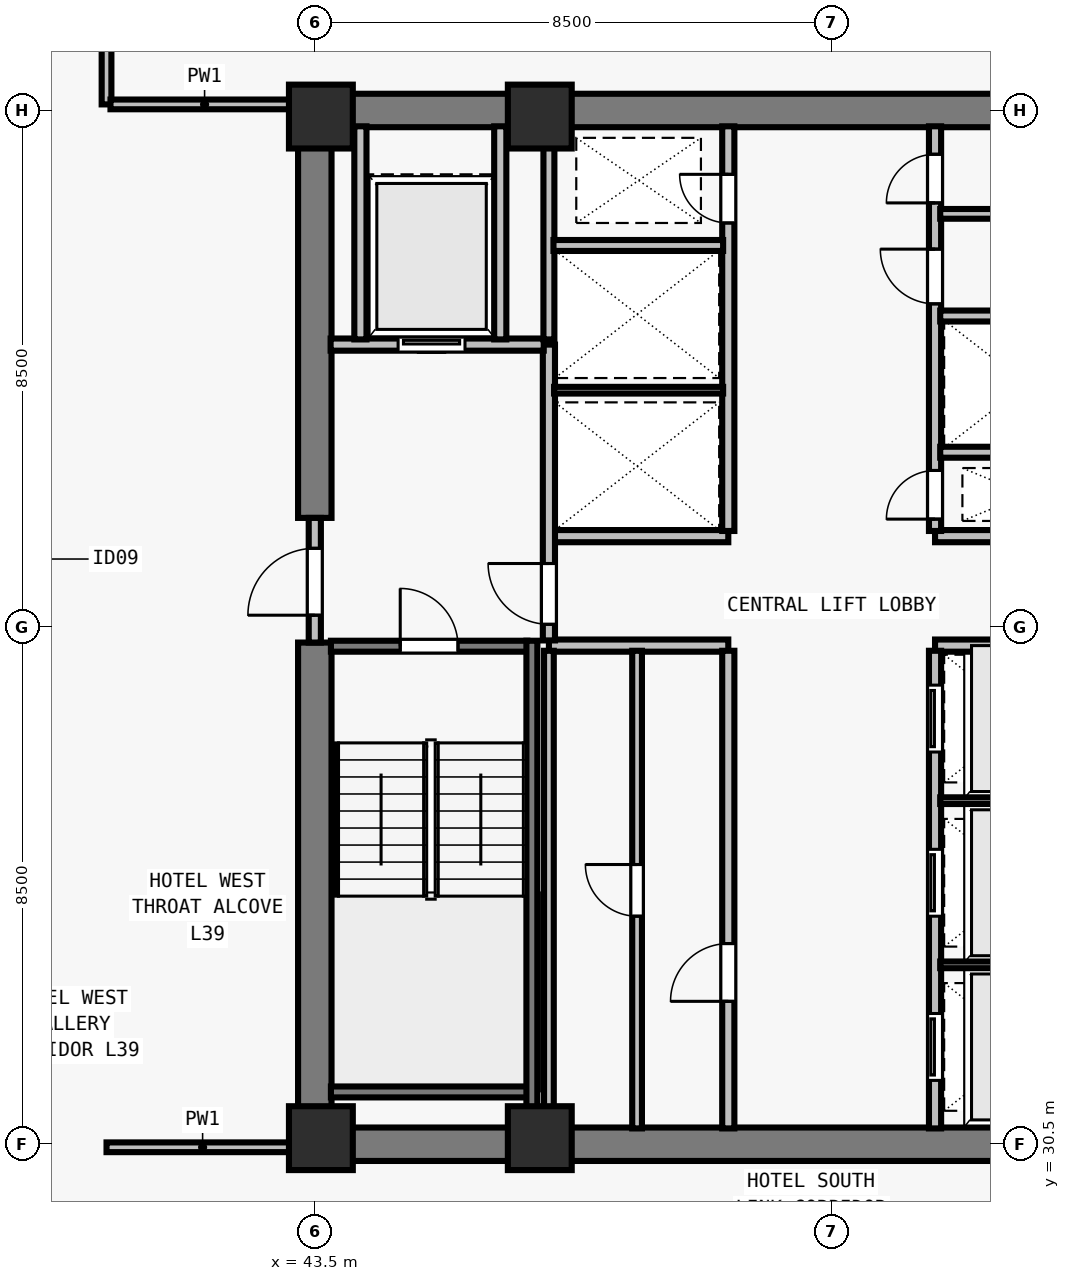
"""IFC4 building model, lengths in metres.
Left out: names, types, materials, properties, quantities, classifications, styles, units other than length and angle.
Written with IfcOpenShell. Run it as: python <this file> out.ifc"""

import sys

from ifc_helpers import new_model, si_unit, direction, frame, frame_2d, origin, origin_2d, place, context, subcontext, project, spatial, rectangle, extrude, element, fill, save


model = new_model("IFC4")
c1 = context("Model", 3, precision=1e-05, world=origin(), true_north=direction((0.0, 1.0)))
c2 = subcontext(c1, "Body", "Model", "MODEL_VIEW")
j1 = project(units=[si_unit("LENGTHUNIT", "METRE"), si_unit("PLANEANGLEUNIT", "RADIAN")], contexts=[c1])
p1 = place(None, origin())
s1 = spatial("IfcSite", under=j1, at=p1, CompositionType="ELEMENT")
p2 = place(p1, origin())
s2 = spatial("IfcBuilding", under=s1, at=p2, CompositionType="ELEMENT")
p3 = place(p2, frame((0.0, 0.0, 144.5)))
s3 = spatial("IfcBuildingStorey", under=s2, at=p3, CompositionType="ELEMENT", Elevation=144.5)
for number, where, z_axis, x_axis in (
    (1, (43.6, 30.6, 0.0), (0.0, 0.0, 1.0), (1.0, 0.0, 0.0)),
    (2, (47.2, 30.6, 0.0), (0.0, 0.0, 1.0), (1.0, 0.0, 0.0)),
    (3, (43.6, 47.4, 0.0), (0.0, 0.0, 1.0), (1.0, 0.0, 0.0)),
    (4, (47.2, 47.4, 0.0), (0.0, 0.0, 1.0), (1.0, 0.0, 0.0)),
):
    element("IfcColumn", number, at=place(p3, frame(where, z_axis=z_axis, x_axis=x_axis)), inside=s3, PredefinedType="COLUMN", context=c2, shape_type="SweptSolid", body=[
        extrude(rectangle(XDim=1.05, YDim=1.05, at=origin_2d()), origin(), (0.0, 0.0, 1.0), 3.5),
    ])
for number, where, z_axis, x_axis in (
    (5, (43.225, 30.5, 0.0), (0.0, 0.0, 1.0), (1.0, 0.0, 0.0)),
    (6, (43.225, 47.5, 0.0), (0.0, 0.0, 1.0), (1.0, 0.0, 0.0)),
):
    element("IfcWall", number, at=place(p3, frame(where, z_axis=z_axis, x_axis=x_axis)), inside=s3, PredefinedType="SHEAR", context=c2, shape_type="SweptSolid", body=[
        extrude(rectangle(XDim=17.55, YDim=0.55, at=frame_2d((8.775, 0.0))), origin(), (0.0, 0.0, 1.0), 3.28),
    ])
p4 = place(p3, frame((43.5, 30.765, 0.0), z_axis=(0.0, 0.0, 1.0), x_axis=(0.0, 1.0, 0.0)))
e7 = element("IfcWall", 7, at=p4, inside=s3, PredefinedType="SHEAR", context=c2, shape_type="SweptSolid", body=[
    extrude(rectangle(XDim=7.985, YDim=0.55, at=frame_2d((3.993, 0.0))), origin(), (0.0, 0.0, 1.0), 3.28),
])
p5 = place(p3, frame((43.5, 40.8, 0.0), z_axis=(0.0, 0.0, 1.0), x_axis=(0.0, 1.0, 0.0)))
e8 = element("IfcWall", 8, at=p5, inside=s3, PredefinedType="SHEAR", context=c2, shape_type="SweptSolid", body=[
    extrude(rectangle(XDim=6.435, YDim=0.55, at=frame_2d((3.218, 0.0))), origin(), (0.0, 0.0, 1.0), 3.28),
])
for number, where, z_axis, x_axis in (
    (9, (47.35, 38.7, 0.0), (0.0, 0.0, 1.0), (1.0, 0.0, 0.0)),
    (10, (47.35, 40.5, 0.0), (0.0, 0.0, 1.0), (1.0, 0.0, 0.0)),
    (11, (53.7, 38.7, 0.0), (0.0, 0.0, 1.0), (1.0, 0.0, 0.0)),
    (12, (53.7, 40.5, 0.0), (0.0, 0.0, 1.0), (1.0, 0.0, 0.0)),
):
    element("IfcWall", number, at=place(p3, frame(where, z_axis=z_axis, x_axis=x_axis)), inside=s3, PredefinedType="SOLIDWALL", context=c2, shape_type="SweptSolid", body=[
        extrude(rectangle(XDim=2.95, YDim=0.2, at=frame_2d((1.475, 0.0))), origin(), (0.0, 0.0, 1.0), 3.28),
    ])
p6 = place(p3, frame((50.3, 30.76, 0.0), z_axis=(0.0, 0.0, 1.0), x_axis=(0.0, 1.0, 0.0)))
e13 = element("IfcWall", 13, at=p6, inside=s3, PredefinedType="SOLIDWALL", context=c2, shape_type="SweptSolid", body=[
    extrude(rectangle(XDim=7.855, YDim=0.2, at=frame_2d((3.927, 0.0))), origin(), (0.0, 0.0, 1.0), 3.28),
])
p7 = place(p6, frame((2.09, 0.0, 0.0)))
e14 = element("IfcOpeningElement", 14, at=p7, cuts=e13, PredefinedType="OPENING", context=c2, shape_type="SweptSolid", body=[
    extrude(rectangle(XDim=0.95, YDim=2.12, at=frame_2d((0.475, 1.06))), frame((0.0, 0.11, 0.0), z_axis=(0.0, -1.0, 0.0), x_axis=(1.0, 0.0, 0.0)), (0.0, 0.0, 1.0), 0.22),
])
p8 = place(p3, frame((53.7, 30.76, 0.0), z_axis=(0.0, 0.0, 1.0), x_axis=(0.0, 1.0, 0.0)))
e15 = element("IfcWall", 15, at=p8, inside=s3, PredefinedType="SOLIDWALL", context=c2, shape_type="SweptSolid", body=[
    extrude(rectangle(XDim=7.855, YDim=0.2, at=frame_2d((3.927, 0.0))), origin(), (0.0, 0.0, 1.0), 3.28),
])
p9 = place(p8, frame((0.79, 0.0, 0.0)))
e16 = element("IfcOpeningElement", 16, at=p9, cuts=e15, PredefinedType="OPENING", context=c2, shape_type="SweptSolid", body=[
    extrude(rectangle(XDim=1.1, YDim=2.2, at=frame_2d((0.55, 1.1))), frame((0.0, 0.11, 0.0), z_axis=(0.0, -1.0, 0.0), x_axis=(1.0, 0.0, 0.0)), (0.0, 0.0, 1.0), 0.22),
])
p10 = place(p8, frame((3.49, 0.0, 0.0)))
e17 = element("IfcOpeningElement", 17, at=p10, cuts=e15, PredefinedType="OPENING", context=c2, shape_type="SweptSolid", body=[
    extrude(rectangle(XDim=1.1, YDim=2.2, at=frame_2d((0.55, 1.1))), frame((0.0, 0.11, 0.0), z_axis=(0.0, -1.0, 0.0), x_axis=(1.0, 0.0, 0.0)), (0.0, 0.0, 1.0), 0.22),
])
p11 = place(p8, frame((6.19, 0.0, 0.0)))
e18 = element("IfcOpeningElement", 18, at=p11, cuts=e15, PredefinedType="OPENING", context=c2, shape_type="SweptSolid", body=[
    extrude(rectangle(XDim=1.1, YDim=2.2, at=frame_2d((0.55, 1.1))), frame((0.0, 0.11, 0.0), z_axis=(0.0, -1.0, 0.0), x_axis=(1.0, 0.0, 0.0)), (0.0, 0.0, 1.0), 0.22),
])
p12 = place(p3, frame((50.3, 40.585, 0.0), z_axis=(0.0, 0.0, 1.0), x_axis=(0.0, 1.0, 0.0)))
e19 = element("IfcWall", 19, at=p12, inside=s3, PredefinedType="SOLIDWALL", context=c2, shape_type="SweptSolid", body=[
    extrude(rectangle(XDim=6.655, YDim=0.2, at=frame_2d((3.328, 0.0))), origin(), (0.0, 0.0, 1.0), 3.28),
])
p13 = place(p12, frame((5.065, 0.0, 0.0)))
e20 = element("IfcOpeningElement", 20, at=p13, cuts=e19, PredefinedType="OPENING", context=c2, shape_type="SweptSolid", body=[
    extrude(rectangle(XDim=0.8, YDim=2.08, at=frame_2d((0.4, 1.04))), frame((0.0, 0.11, 0.0), z_axis=(0.0, -1.0, 0.0), x_axis=(1.0, 0.0, 0.0)), (0.0, 0.0, 1.0), 0.22),
])
p14 = place(p3, frame((53.7, 40.585, 0.0), z_axis=(0.0, 0.0, 1.0), x_axis=(0.0, 1.0, 0.0)))
e21 = element("IfcWall", 21, at=p14, inside=s3, PredefinedType="SOLIDWALL", context=c2, shape_type="SweptSolid", body=[
    extrude(rectangle(XDim=6.655, YDim=0.2, at=frame_2d((3.328, 0.0))), origin(), (0.0, 0.0, 1.0), 3.28),
])
p15 = place(p14, frame((0.195, 0.0, 0.0)))
e22 = element("IfcOpeningElement", 22, at=p15, cuts=e21, PredefinedType="OPENING", context=c2, shape_type="SweptSolid", body=[
    extrude(rectangle(XDim=0.8, YDim=2.08, at=frame_2d((0.4, 1.04))), frame((0.0, 0.11, 0.0), z_axis=(0.0, -1.0, 0.0), x_axis=(1.0, 0.0, 0.0)), (0.0, 0.0, 1.0), 0.22),
])
p16 = place(p14, frame((3.735, 0.0, 0.0)))
e23 = element("IfcOpeningElement", 23, at=p16, cuts=e21, PredefinedType="OPENING", context=c2, shape_type="SweptSolid", body=[
    extrude(rectangle(XDim=0.9, YDim=2.12, at=frame_2d((0.45, 1.06))), frame((0.0, 0.11, 0.0), z_axis=(0.0, -1.0, 0.0), x_axis=(1.0, 0.0, 0.0)), (0.0, 0.0, 1.0), 0.22),
])
p17 = place(p14, frame((5.395, 0.0, 0.0)))
e24 = element("IfcOpeningElement", 24, at=p17, cuts=e21, PredefinedType="OPENING", context=c2, shape_type="SweptSolid", body=[
    extrude(rectangle(XDim=0.8, YDim=2.1, at=frame_2d((0.4, 1.05))), frame((0.0, 0.11, 0.0), z_axis=(0.0, -1.0, 0.0), x_axis=(1.0, 0.0, 0.0)), (0.0, 0.0, 1.0), 0.22),
])
p18 = place(p3, frame((43.5, 38.75, 0.0), z_axis=(0.0, 0.0, 1.0), x_axis=(0.0, 1.0, 0.0)))
e25 = element("IfcWall", 25, at=p18, inside=s3, PredefinedType="SOLIDWALL", context=c2, shape_type="SweptSolid", body=[
    extrude(rectangle(XDim=2.05, YDim=0.2, at=frame_2d((1.025, 0.0))), origin(), (0.0, 0.0, 1.0), 3.28),
])
p19 = place(p18, frame((0.45, 0.0, 0.0)))
e26 = element("IfcOpeningElement", 26, at=p19, cuts=e25, PredefinedType="OPENING", context=c2, shape_type="SweptSolid", body=[
    extrude(rectangle(XDim=1.1, YDim=2.15, at=frame_2d((0.55, 1.075))), frame((0.0, 0.11, 0.0), z_axis=(0.0, -1.0, 0.0), x_axis=(1.0, 0.0, 0.0)), (0.0, 0.0, 1.0), 0.22),
])
p20 = place(p3, frame((47.35, 38.785, 0.0), z_axis=(0.0, 0.0, 1.0), x_axis=(0.0, 1.0, 0.0)))
e27 = element("IfcWall", 27, at=p20, inside=s3, PredefinedType="SOLIDWALL", context=c2, shape_type="SweptSolid", body=[
    extrude(rectangle(XDim=4.865, YDim=0.2, at=frame_2d((2.433, 0.0))), origin(), (0.0, 0.0, 1.0), 3.28),
])
p21 = place(p20, frame((0.265, 0.0, 0.0)))
e28 = element("IfcOpeningElement", 28, at=p21, cuts=e27, PredefinedType="OPENING", context=c2, shape_type="SweptSolid", body=[
    extrude(rectangle(XDim=1.0, YDim=2.15, at=frame_2d((0.5, 1.075))), frame((0.0, 0.11, 0.0), z_axis=(0.0, -1.0, 0.0), x_axis=(1.0, 0.0, 0.0)), (0.0, 0.0, 1.0), 0.22),
])
p22 = place(p3, frame((43.76, 43.65, 0.0), z_axis=(0.0, 0.0, 1.0), x_axis=(1.0, 0.0, 0.0)))
e29 = element("IfcWall", 29, at=p22, inside=s3, PredefinedType="SOLIDWALL", context=c2, shape_type="SweptSolid", body=[
    extrude(rectangle(XDim=3.505, YDim=0.2, at=frame_2d((1.752, 0.0))), origin(), (0.0, 0.0, 1.0), 3.28),
])
p23 = place(p22, frame((1.11, 0.0, 0.0)))
e30 = element("IfcOpeningElement", 30, at=p23, cuts=e29, PredefinedType="OPENING", context=c2, shape_type="SweptSolid", body=[
    extrude(rectangle(XDim=1.1, YDim=2.2, at=frame_2d((0.55, 1.1))), frame((0.0, 0.11, 0.0), z_axis=(0.0, -1.0, 0.0), x_axis=(1.0, 0.0, 0.0)), (0.0, 0.0, 1.0), 0.22),
])
for number, where, z_axis, x_axis in (
    (31, (46.55, 43.735, 0.0), (0.0, 0.0, 1.0), (0.0, 1.0, 0.0)),
    (32, (44.25, 43.735, 0.0), (0.0, 0.0, 1.0), (0.0, 1.0, 0.0)),
):
    element("IfcWall", number, at=place(p3, frame(where, z_axis=z_axis, x_axis=x_axis)), inside=s3, PredefinedType="SOLIDWALL", context=c2, shape_type="SweptSolid", body=[
        extrude(rectangle(XDim=3.505, YDim=0.2, at=frame_2d((1.752, 0.0))), origin(), (0.0, 0.0, 1.0), 3.28),
    ])
p24 = place(p3, frame((47.35, 30.76, 0.0), z_axis=(0.0, 0.0, 1.0), x_axis=(0.0, 1.0, 0.0)))
e33 = element("IfcWall", 33, at=p24, inside=s3, PredefinedType="PARTITIONING", context=c2, shape_type="SweptSolid", body=[
    extrude(rectangle(XDim=7.855, YDim=0.16, at=frame_2d((3.927, 0.0))), origin(), (0.0, 0.0, 1.0), 3.28),
])
p25 = place(p3, frame((48.8, 30.76, 0.0), z_axis=(0.0, 0.0, 1.0), x_axis=(0.0, 1.0, 0.0)))
e34 = element("IfcWall", 34, at=p25, inside=s3, PredefinedType="PARTITIONING", context=c2, shape_type="SweptSolid", body=[
    extrude(rectangle(XDim=7.855, YDim=0.16, at=frame_2d((3.927, 0.0))), origin(), (0.0, 0.0, 1.0), 3.28),
])
p26 = place(p25, frame((3.49, 0.0, 0.0)))
e35 = element("IfcOpeningElement", 35, at=p26, cuts=e34, PredefinedType="OPENING", context=c2, shape_type="SweptSolid", body=[
    extrude(rectangle(XDim=0.85, YDim=2.12, at=frame_2d((0.425, 1.06))), frame((0.0, 0.09, 0.0), z_axis=(0.0, -1.0, 0.0), x_axis=(1.0, 0.0, 0.0)), (0.0, 0.0, 1.0), 0.18),
])
for number, where, z_axis, x_axis in (
    (36, (53.785, 33.45, 0.0), (0.0, 0.0, 1.0), (1.0, 0.0, 0.0)),
    (37, (53.785, 36.15, 0.0), (0.0, 0.0, 1.0), (1.0, 0.0, 0.0)),
):
    element("IfcWall", number, at=place(p3, frame(where, z_axis=z_axis, x_axis=x_axis)), inside=s3, PredefinedType="PARTITIONING", context=c2, shape_type="SweptSolid", body=[
        extrude(rectangle(XDim=2.79, YDim=0.11, at=frame_2d((1.395, 0.0))), origin(), (0.0, 0.0, 1.0), 3.28),
    ])
p27 = place(p3, frame((47.35, 43.735, 0.0), z_axis=(0.0, 0.0, 1.0), x_axis=(0.0, 1.0, 0.0)))
e38 = element("IfcWall", 38, at=p27, inside=s3, PredefinedType="SOLIDWALL", context=c2, shape_type="SweptSolid", body=[
    extrude(rectangle(XDim=3.505, YDim=0.18, at=frame_2d((1.752, 0.0))), origin(), (0.0, 0.0, 1.0), 3.28),
])
p28 = place(p3, frame((47.435, 42.9, 0.0), z_axis=(0.0, 0.0, 1.0), x_axis=(1.0, 0.0, 0.0)))
e39 = element("IfcWall", 39, at=p28, inside=s3, PredefinedType="PARTITIONING", context=c2, shape_type="SweptSolid", body=[
    extrude(rectangle(XDim=2.78, YDim=0.11, at=frame_2d((1.39, 0.0))), origin(), (0.0, 0.0, 1.0), 3.28),
])
p29 = place(p3, frame((47.425, 45.28, 0.0), z_axis=(0.0, 0.0, 1.0), x_axis=(1.0, 0.0, 0.0)))
e40 = element("IfcWall", 40, at=p29, inside=s3, PredefinedType="SOLIDWALL", context=c2, shape_type="SweptSolid", body=[
    extrude(rectangle(XDim=2.79, YDim=0.18, at=frame_2d((1.395, 0.0))), origin(), (0.0, 0.0, 1.0), 3.28),
])
p30 = place(p3, frame((53.785, 41.88, 0.0), z_axis=(0.0, 0.0, 1.0), x_axis=(1.0, 0.0, 0.0)))
e41 = element("IfcWall", 41, at=p30, inside=s3, PredefinedType="SOLIDWALL", context=c2, shape_type="SweptSolid", body=[
    extrude(rectangle(XDim=2.78, YDim=0.18, at=frame_2d((1.39, 0.0))), origin(), (0.0, 0.0, 1.0), 3.28),
])
p31 = place(p3, frame((53.785, 44.12, 0.0), z_axis=(0.0, 0.0, 1.0), x_axis=(1.0, 0.0, 0.0)))
e42 = element("IfcWall", 42, at=p31, inside=s3, PredefinedType="SOLIDWALL", context=c2, shape_type="SweptSolid", body=[
    extrude(rectangle(XDim=2.79, YDim=0.18, at=frame_2d((1.395, 0.0))), origin(), (0.0, 0.0, 1.0), 3.28),
])
p32 = place(p3, frame((53.785, 45.8, 0.0), z_axis=(0.0, 0.0, 1.0), x_axis=(1.0, 0.0, 0.0)))
e43 = element("IfcWall", 43, at=p32, inside=s3, PredefinedType="PARTITIONING", context=c2, shape_type="SweptSolid", body=[
    extrude(rectangle(XDim=2.79, YDim=0.16, at=frame_2d((1.395, 0.0))), origin(), (0.0, 0.0, 1.0), 3.28),
])
p33 = place(p3, frame((40.075, 47.6, 0.0), z_axis=(0.0, 0.0, 1.0), x_axis=(0.0, 1.0, 0.0)))
e44 = element("IfcWall", 44, at=p33, inside=s3, PredefinedType="PARTITIONING", context=c2, shape_type="SweptSolid", body=[
    extrude(rectangle(XDim=15.075, YDim=0.16, at=frame_2d((7.538, 0.0))), origin(), (0.0, 0.0, 1.0), 2.555),
])
p34 = place(p33, frame((1.8, 0.0, 0.0)))
e45 = element("IfcOpeningElement", 45, at=p34, cuts=e44, PredefinedType="OPENING", context=c2, shape_type="SweptSolid", body=[
    extrude(rectangle(XDim=0.96, YDim=2.12, at=frame_2d((0.48, 1.06))), frame((0.0, 0.09, 0.0), z_axis=(0.0, -1.0, 0.0), x_axis=(1.0, 0.0, 0.0)), (0.0, 0.0, 1.0), 0.18),
])
p35 = place(p3, frame((40.075, 30.45, 0.0), z_axis=(0.0, 0.0, 1.0), x_axis=(1.0, 0.0, 0.0)))
e46 = element("IfcWall", 46, at=p35, inside=s3, PredefinedType="PARTITIONING", context=c2, shape_type="SweptSolid", body=[
    extrude(rectangle(XDim=3.16, YDim=0.16, at=frame_2d((1.58, 0.0))), origin(), (0.0, 0.0, 1.0), 3.28),
])
p36 = place(p3, frame((40.14, 47.6, 0.0), z_axis=(0.0, 0.0, 1.0), x_axis=(1.0, 0.0, 0.0)))
e47 = element("IfcWall", 47, at=p36, inside=s3, PredefinedType="PARTITIONING", context=c2, shape_type="SweptSolid", body=[
    extrude(rectangle(XDim=3.095, YDim=0.16, at=frame_2d((1.548, 0.0))), origin(), (0.0, 0.0, 1.0), 3.28),
])
p37 = place(p3, frame((43.765, 38.69, 0.0), z_axis=(0.0, 0.0, 1.0), x_axis=(1.0, 0.0, 0.0)))
e48 = element("IfcWall", 48, at=p37, inside=s3, PredefinedType="SOLIDWALL", context=c2, shape_type="SweptSolid", body=[
    extrude(rectangle(XDim=3.23, YDim=0.18, at=frame_2d((1.615, 0.0))), origin(), (0.0, 0.0, 1.0), 3.28),
])
p38 = place(p37, frame((1.14, 0.0, 0.0)))
e49 = element("IfcOpeningElement", 49, at=p38, cuts=e48, PredefinedType="OPENING", context=c2, shape_type="SweptSolid", body=[
    extrude(rectangle(XDim=0.95, YDim=2.15, at=frame_2d((0.475, 1.075))), frame((0.0, 0.1, 0.0), z_axis=(0.0, -1.0, 0.0), x_axis=(1.0, 0.0, 0.0)), (0.0, 0.0, 1.0), 0.2),
])
p39 = place(p3, frame((43.765, 31.36, 0.0), z_axis=(0.0, 0.0, 1.0), x_axis=(1.0, 0.0, 0.0)))
e50 = element("IfcWall", 50, at=p39, inside=s3, PredefinedType="SOLIDWALL", context=c2, shape_type="SweptSolid", body=[
    extrude(rectangle(XDim=3.23, YDim=0.18, at=frame_2d((1.615, 0.0))), origin(), (0.0, 0.0, 1.0), 3.28),
])
p40 = place(p3, frame((47.07, 38.78, 0.0), z_axis=(0.0, 0.0, 1.0), x_axis=(0.0, -1.0, 0.0)))
e51 = element("IfcWall", 51, at=p40, inside=s3, PredefinedType="SOLIDWALL", context=c2, shape_type="SweptSolid", body=[
    extrude(rectangle(XDim=8.017, YDim=0.18, at=frame_2d((4.009, 0.0))), origin(), (0.0, 0.0, 1.0), 3.28),
])
p41 = place(p19, origin())
e52 = element("IfcDoor", 52, at=p41, inside=s3, OperationType="SINGLE_SWING_LEFT", PredefinedType="DOOR", context=c2, shape_type="SweptSolid", body=[
    extrude(rectangle(XDim=1.1, YDim=2.15, at=frame_2d((0.55, 1.075))), frame((0.0, 0.025, 0.0), z_axis=(0.0, -1.0, 0.0), x_axis=(1.0, 0.0, 0.0)), (0.0, 0.0, 1.0), 0.05),
])
fill(e26, e52)
p42 = place(p21, origin())
e53 = element("IfcDoor", 53, at=p42, inside=s3, OperationType="SINGLE_SWING_RIGHT", PredefinedType="DOOR", context=c2, shape_type="SweptSolid", body=[
    extrude(rectangle(XDim=1.0, YDim=2.15, at=frame_2d((0.5, 1.075))), frame((0.0, 0.025, 0.0), z_axis=(0.0, -1.0, 0.0), x_axis=(1.0, 0.0, 0.0)), (0.0, 0.0, 1.0), 0.05),
])
fill(e28, e53)
p43 = place(p23, origin())
e54 = element("IfcDoor", 54, at=p43, inside=s3, OperationType="SLIDING_TO_LEFT", PredefinedType="DOOR", context=c2, shape_type="SweptSolid", body=[
    extrude(rectangle(XDim=1.1, YDim=2.2, at=frame_2d((0.55, 1.1))), frame((0.0, 0.025, 0.0), z_axis=(0.0, -1.0, 0.0), x_axis=(1.0, 0.0, 0.0)), (0.0, 0.0, 1.0), 0.05),
])
fill(e30, e54)
p44 = place(p7, origin())
e55 = element("IfcDoor", 55, at=p44, inside=s3, OperationType="SINGLE_SWING_LEFT", PredefinedType="DOOR", context=c2, shape_type="SweptSolid", body=[
    extrude(rectangle(XDim=0.95, YDim=2.12, at=frame_2d((0.475, 1.06))), frame((0.0, 0.025, 0.0), z_axis=(0.0, -1.0, 0.0), x_axis=(1.0, 0.0, 0.0)), (0.0, 0.0, 1.0), 0.05),
])
fill(e14, e55)
p45 = place(p26, origin())
e56 = element("IfcDoor", 56, at=p45, inside=s3, OperationType="SINGLE_SWING_RIGHT", PredefinedType="DOOR", context=c2, shape_type="SweptSolid", body=[
    extrude(rectangle(XDim=0.85, YDim=2.12, at=frame_2d((0.425, 1.06))), frame((0.0, 0.025, 0.0), z_axis=(0.0, -1.0, 0.0), x_axis=(1.0, 0.0, 0.0)), (0.0, 0.0, 1.0), 0.05),
])
fill(e35, e56)
p46 = place(p9, origin())
e57 = element("IfcDoor", 57, at=p46, inside=s3, OperationType="SLIDING_TO_LEFT", PredefinedType="DOOR", context=c2, shape_type="SweptSolid", body=[
    extrude(rectangle(XDim=1.1, YDim=2.2, at=frame_2d((0.55, 1.1))), frame((0.0, 0.025, 0.0), z_axis=(0.0, -1.0, 0.0), x_axis=(1.0, 0.0, 0.0)), (0.0, 0.0, 1.0), 0.05),
])
fill(e16, e57)
p47 = place(p10, origin())
e58 = element("IfcDoor", 58, at=p47, inside=s3, OperationType="SLIDING_TO_LEFT", PredefinedType="DOOR", context=c2, shape_type="SweptSolid", body=[
    extrude(rectangle(XDim=1.1, YDim=2.2, at=frame_2d((0.55, 1.1))), frame((0.0, 0.025, 0.0), z_axis=(0.0, -1.0, 0.0), x_axis=(1.0, 0.0, 0.0)), (0.0, 0.0, 1.0), 0.05),
])
fill(e17, e58)
p48 = place(p11, origin())
e59 = element("IfcDoor", 59, at=p48, inside=s3, OperationType="SLIDING_TO_LEFT", PredefinedType="DOOR", context=c2, shape_type="SweptSolid", body=[
    extrude(rectangle(XDim=1.1, YDim=2.2, at=frame_2d((0.55, 1.1))), frame((0.0, 0.025, 0.0), z_axis=(0.0, -1.0, 0.0), x_axis=(1.0, 0.0, 0.0)), (0.0, 0.0, 1.0), 0.05),
])
fill(e18, e59)
p49 = place(p13, origin())
e60 = element("IfcDoor", 60, at=p49, inside=s3, OperationType="SINGLE_SWING_RIGHT", PredefinedType="DOOR", context=c2, shape_type="SweptSolid", body=[
    extrude(rectangle(XDim=0.8, YDim=2.08, at=frame_2d((0.4, 1.04))), frame((0.0, 0.025, 0.0), z_axis=(0.0, -1.0, 0.0), x_axis=(1.0, 0.0, 0.0)), (0.0, 0.0, 1.0), 0.05),
])
fill(e20, e60)
p50 = place(p15, origin())
e61 = element("IfcDoor", 61, at=p50, inside=s3, OperationType="SINGLE_SWING_LEFT", PredefinedType="DOOR", context=c2, shape_type="SweptSolid", body=[
    extrude(rectangle(XDim=0.8, YDim=2.08, at=frame_2d((0.4, 1.04))), frame((0.0, 0.025, 0.0), z_axis=(0.0, -1.0, 0.0), x_axis=(1.0, 0.0, 0.0)), (0.0, 0.0, 1.0), 0.05),
])
fill(e22, e61)
p51 = place(p16, origin())
e62 = element("IfcDoor", 62, at=p51, inside=s3, OperationType="SINGLE_SWING_RIGHT", PredefinedType="DOOR", context=c2, shape_type="SweptSolid", body=[
    extrude(rectangle(XDim=0.9, YDim=2.12, at=frame_2d((0.45, 1.06))), frame((0.0, 0.025, 0.0), z_axis=(0.0, -1.0, 0.0), x_axis=(1.0, 0.0, 0.0)), (0.0, 0.0, 1.0), 0.05),
])
fill(e23, e62)
p52 = place(p17, origin())
e63 = element("IfcDoor", 63, at=p52, inside=s3, OperationType="SINGLE_SWING_LEFT", PredefinedType="DOOR", context=c2, shape_type="SweptSolid", body=[
    extrude(rectangle(XDim=0.8, YDim=2.1, at=frame_2d((0.4, 1.05))), frame((0.0, 0.025, 0.0), z_axis=(0.0, -1.0, 0.0), x_axis=(1.0, 0.0, 0.0)), (0.0, 0.0, 1.0), 0.05),
])
fill(e24, e63)
p53 = place(p38, origin())
e64 = element("IfcDoor", 64, at=p53, inside=s3, OperationType="SINGLE_SWING_LEFT", PredefinedType="DOOR", context=c2, shape_type="SweptSolid", body=[
    extrude(rectangle(XDim=0.95, YDim=2.15, at=frame_2d((0.475, 1.075))), frame((0.0, 0.025, 0.0), z_axis=(0.0, -1.0, 0.0), x_axis=(1.0, 0.0, 0.0)), (0.0, 0.0, 1.0), 0.05),
])
fill(e49, e64)
save(model, sys.argv[1])
